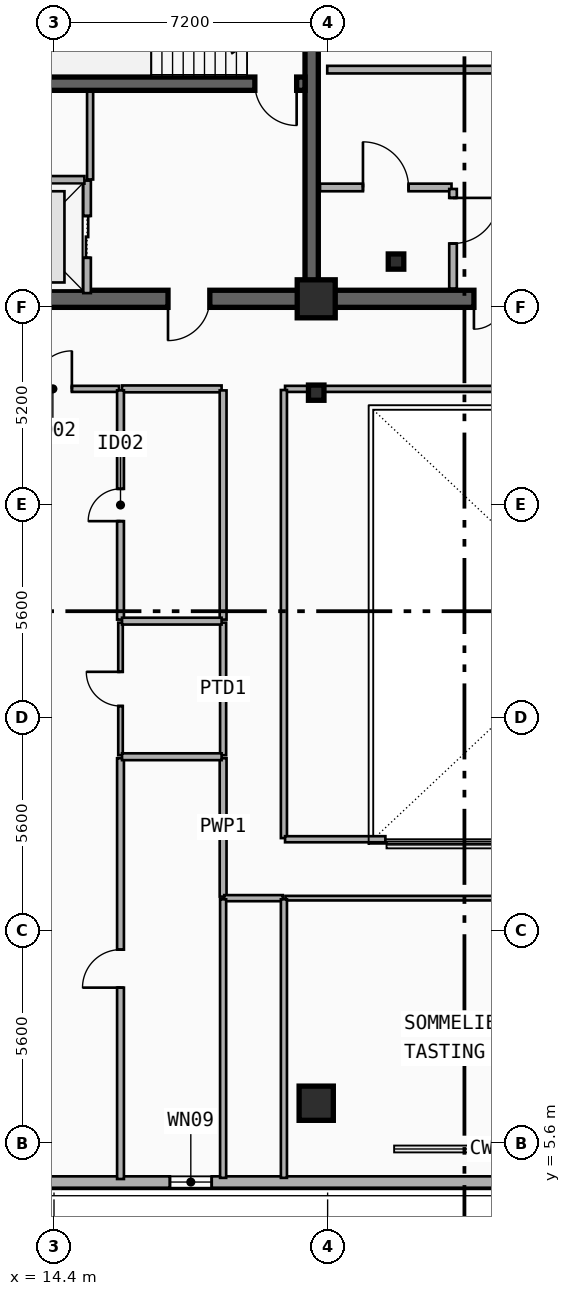
"""IFC4 building model, lengths in metres.
Left out: names, types, materials, properties, quantities, classifications, styles, units other than length and angle.
Written with IfcOpenShell. Run it as: python <this file> out.ifc"""

import sys

from ifc_helpers import new_model, si_unit, direction, frame, frame_2d, origin, origin_2d, place, context, subcontext, project, spatial, rectangle, i_section, extrude, element, fill, save


model = new_model("IFC4")
c1 = context("Model", 3, precision=1e-05, world=origin(), true_north=direction((0.0, 1.0)))
c2 = subcontext(c1, "Body", "Model", "MODEL_VIEW")
j1 = project(units=[si_unit("LENGTHUNIT", "METRE"), si_unit("PLANEANGLEUNIT", "RADIAN")], contexts=[c1])
p1 = place(None, origin())
s1 = spatial("IfcSite", under=j1, at=p1, CompositionType="ELEMENT")
p2 = place(p1, origin())
s2 = spatial("IfcBuilding", under=s1, at=p2, CompositionType="ELEMENT")
p3 = place(p2, frame((0.0, 0.0, 214.8)))
s3 = spatial("IfcBuildingStorey", under=s2, at=p3, CompositionType="ELEMENT", Elevation=214.8)
p4 = place(p3, frame((21.18, 27.82, 0.0), z_axis=(0.0, 0.0, 1.0), x_axis=(-1.0, 0.0, 0.0)))
e1 = element("IfcWall", 1, at=p4, inside=s3, PredefinedType="SHEAR", context=c2, shape_type="SweptSolid", body=[
    extrude(rectangle(XDim=9.03, YDim=0.45, at=frame_2d((4.515, 0.0))), origin(), (0.0, 0.0, 1.0), 3.6),
])
p5 = place(p4, frame((2.68, 0.0, 0.0)))
e2 = element("IfcOpeningElement", 2, at=p5, cuts=e1, PredefinedType="OPENING", context=c2, shape_type="SweptSolid", body=[
    extrude(rectangle(XDim=1.1, YDim=2.15, at=frame_2d((0.55, 1.075))), frame((0.0, 0.235, 0.0), z_axis=(0.0, -1.0, 0.0), x_axis=(1.0, 0.0, 0.0)), (0.0, 0.0, 1.0), 0.47),
])
p6 = place(p3, frame((33.15, 27.82, 0.0), z_axis=(0.0, 0.0, 1.0), x_axis=(-1.0, 0.0, 0.0)))
e3 = element("IfcWall", 3, at=p6, inside=s3, PredefinedType="SHEAR", context=c2, shape_type="SweptSolid", body=[
    extrude(rectangle(XDim=11.97, YDim=0.45, at=frame_2d((5.985, 0.0))), origin(), (0.0, 0.0, 1.0), 3.6),
])
p7 = place(p6, frame((6.1, 0.0, 0.0)))
e4 = element("IfcOpeningElement", 4, at=p7, cuts=e3, PredefinedType="OPENING", context=c2, shape_type="SweptSolid", body=[
    extrude(rectangle(XDim=1.6, YDim=2.2, at=frame_2d((0.8, 1.1))), frame((0.0, 0.235, 0.0), z_axis=(0.0, -1.0, 0.0), x_axis=(1.0, 0.0, 0.0)), (0.0, 0.0, 1.0), 0.47),
])
p8 = place(p3, frame((21.18, 28.045, 0.0), z_axis=(0.0, 0.0, 1.0), x_axis=(0.0, 1.0, 0.0)))
e5 = element("IfcWall", 5, at=p8, inside=s3, PredefinedType="SHEAR", context=c2, shape_type="SweptSolid", body=[
    extrude(rectangle(XDim=8.78, YDim=0.35, at=frame_2d((4.39, 0.0))), origin(), (0.0, 0.0, 1.0), 3.6),
])
p9 = place(p3, frame((21.005, 33.48, 0.0), z_axis=(0.0, 0.0, 1.0), x_axis=(-1.0, 0.0, 0.0)))
e6 = element("IfcWall", 6, at=p9, inside=s3, PredefinedType="SHEAR", context=c2, shape_type="SweptSolid", body=[
    extrude(rectangle(XDim=8.63, YDim=0.35, at=frame_2d((4.315, 0.0))), origin(), (0.0, 0.0, 1.0), 3.6),
])
p10 = place(p9, frame((0.22, 0.0, 0.0)))
e7 = element("IfcOpeningElement", 7, at=p10, cuts=e6, PredefinedType="OPENING", context=c2, shape_type="SweptSolid", body=[
    extrude(rectangle(XDim=1.1, YDim=2.15, at=frame_2d((0.55, 1.075))), frame((0.0, 0.185, 0.0), z_axis=(0.0, -1.0, 0.0), x_axis=(1.0, 0.0, 0.0)), (0.0, 0.0, 1.0), 0.37),
])
p11 = place(p3, frame((23.4, 28.8, 0.0), z_axis=(0.0, 0.0, 1.0), x_axis=(1.0, 0.0, 0.0)))
e8 = element("IfcColumn", 8, at=p11, inside=s3, PredefinedType="COLUMN", context=c2, shape_type="SweptSolid", body=[
    extrude(i_section(OverallWidth=0.408, OverallDepth=0.4, WebThickness=0.025, FlangeThickness=0.039, FilletRadius=0.015, at=origin_2d()), origin(), (0.0, 0.0, 1.0), 3.6),
])
p12 = place(p3, frame((21.3, 27.82, 0.0), z_axis=(0.0, 0.0, 1.0), x_axis=(1.0, 0.0, 0.0)))
e9 = element("IfcColumn", 9, at=p12, inside=s3, PredefinedType="COLUMN", context=c2, shape_type="SweptSolid", body=[
    extrude(rectangle(XDim=1.0, YDim=1.0, at=origin_2d()), origin(), (0.0, 0.0, 1.0), 3.6),
])
p13 = place(p3, frame((21.3, 25.35, 0.0), z_axis=(0.0, 0.0, 1.0), x_axis=(1.0, 0.0, 0.0)))
e10 = element("IfcColumn", 10, at=p13, inside=s3, PredefinedType="COLUMN", context=c2, shape_type="SweptSolid", body=[
    extrude(i_section(OverallWidth=0.408, OverallDepth=0.4, WebThickness=0.025, FlangeThickness=0.039, FilletRadius=0.015, at=origin_2d()), origin(), (0.0, 0.0, 1.0), 3.6),
])
p14 = place(p3, frame((21.3, 6.763, 0.0), z_axis=(0.0, -0.090237335163, 0.995920289653), x_axis=(1.0, 0.0, 0.0)))
e11 = element("IfcColumn", 11, at=p14, inside=s3, PredefinedType="COLUMN", context=c2, shape_type="SweptSolid", body=[
    extrude(rectangle(XDim=0.9, YDim=0.9, at=origin_2d()), origin(), (0.0, 0.0, 1.0), 3.615),
])
p15 = place(p3, frame((48.0, 4.58, 0.0), z_axis=(0.0, 0.0, 1.0), x_axis=(-1.0, 0.0, 0.0)))
e12 = element("IfcWall", 12, at=p15, inside=s3, PredefinedType="SOLIDWALL", context=c2, shape_type="SweptSolid", body=[
    extrude(rectangle(XDim=38.4, YDim=0.3, at=frame_2d((19.2, 0.0))), origin(), (0.0, 0.0, 1.0), 3.34),
])
p16 = place(p15, frame((33.909, 0.0, 1.05)))
e13 = element("IfcOpeningElement", 13, at=p16, cuts=e12, PredefinedType="OPENING", context=c2, shape_type="SweptSolid", body=[
    extrude(rectangle(XDim=1.2, YDim=1.5, at=frame_2d((0.6, 0.75))), frame((0.0, 0.16, 0.0), z_axis=(0.0, -1.0, 0.0), x_axis=(1.0, 0.0, 0.0)), (0.0, 0.0, 1.0), 0.32),
])
p17 = place(p15, frame((29.45, 0.0, 0.48)))
e14 = element("IfcOpeningElement", 14, at=p17, cuts=e12, PredefinedType="OPENING", context=c2, shape_type="SweptSolid", body=[
    extrude(rectangle(XDim=1.1, YDim=1.05, at=frame_2d((0.55, 0.525))), frame((0.0, 0.16, 0.0), z_axis=(0.0, -1.0, 0.0), x_axis=(1.0, 0.0, 0.0)), (0.0, 0.0, 1.0), 0.32),
])
p18 = place(p15, frame((35.994, 0.0, 0.48)))
e15 = element("IfcOpeningElement", 15, at=p18, cuts=e12, PredefinedType="OPENING", context=c2, shape_type="SweptSolid", body=[
    extrude(rectangle(XDim=1.8, YDim=1.8, at=frame_2d((0.9, 0.9))), frame((0.0, 0.16, 0.0), z_axis=(0.0, -1.0, 0.0), x_axis=(1.0, 0.0, 0.0)), (0.0, 0.0, 1.0), 0.32),
])
p19 = place(p15, frame((13.014, 0.0, 0.65)))
e16 = element("IfcOpeningElement", 16, at=p19, cuts=e12, PredefinedType="OPENING", context=c2, shape_type="SweptSolid", body=[
    extrude(rectangle(XDim=2.0, YDim=2.2, at=frame_2d((1.0, 1.1))), frame((0.0, 0.16, 0.0), z_axis=(0.0, -1.0, 0.0), x_axis=(1.0, 0.0, 0.0)), (0.0, 0.0, 1.0), 0.32),
])
p20 = place(p15, frame((2.9, 0.0, 0.34)))
e17 = element("IfcOpeningElement", 17, at=p20, cuts=e12, PredefinedType="OPENING", context=c2, shape_type="SweptSolid", body=[
    extrude(rectangle(XDim=1.8, YDim=1.8, at=frame_2d((0.9, 0.9))), frame((0.0, 0.16, 0.0), z_axis=(0.0, -1.0, 0.0), x_axis=(1.0, 0.0, 0.0)), (0.0, 0.0, 1.0), 0.32),
])
p21 = place(p15, frame((0.41, 0.0, 0.48)))
e18 = element("IfcOpeningElement", 18, at=p21, cuts=e12, PredefinedType="OPENING", context=c2, shape_type="SweptSolid", body=[
    extrude(rectangle(XDim=1.8, YDim=1.8, at=frame_2d((0.9, 0.9))), frame((0.0, 0.16, 0.0), z_axis=(0.0, -1.0, 0.0), x_axis=(1.0, 0.0, 0.0)), (0.0, 0.0, 1.0), 0.32),
])
p22 = place(p3, frame((15.27, 27.97, 0.0), z_axis=(0.0, 0.0, 1.0), x_axis=(0.0, 1.0, 0.0)))
e19 = element("IfcWall", 19, at=p22, inside=s3, PredefinedType="PARTITIONING", context=c2, shape_type="SweptSolid", body=[
    extrude(rectangle(XDim=2.96, YDim=0.2, at=frame_2d((1.48, 0.0))), origin(), (0.0, 0.0, 1.0), 2.41),
])
p23 = place(p22, frame((0.93, 0.0, 0.0)))
e20 = element("IfcOpeningElement", 20, at=p23, cuts=e19, PredefinedType="OPENING", context=c2, shape_type="SweptSolid", body=[
    extrude(rectangle(XDim=1.1, YDim=2.15, at=frame_2d((0.55, 1.075))), frame((0.0, 0.11, 0.0), z_axis=(0.0, -1.0, 0.0), x_axis=(1.0, 0.0, 0.0)), (0.0, 0.0, 1.0), 0.22),
])
p24 = place(p3, frame((12.45, 30.95, 0.0), z_axis=(0.0, 0.0, 1.0), x_axis=(1.0, 0.0, 0.0)))
e21 = element("IfcWall", 21, at=p24, inside=s3, PredefinedType="PARTITIONING", context=c2, shape_type="SweptSolid", body=[
    extrude(rectangle(XDim=2.75, YDim=0.2, at=frame_2d((1.375, 0.0))), origin(), (0.0, 0.0, 1.0), 2.41),
])
p25 = place(p3, frame((21.4, 30.75, 0.0), z_axis=(0.0, 0.0, 1.0), x_axis=(1.0, 0.0, 0.0)))
e22 = element("IfcWall", 22, at=p25, inside=s3, PredefinedType="PARTITIONING", context=c2, shape_type="SweptSolid", body=[
    extrude(rectangle(XDim=3.46, YDim=0.2, at=frame_2d((1.73, 0.0))), origin(), (0.0, 0.0, 1.0), 2.41),
])
p26 = place(p25, frame((1.13, 0.0, 0.0)))
e23 = element("IfcOpeningElement", 23, at=p26, cuts=e22, PredefinedType="OPENING", context=c2, shape_type="SweptSolid", body=[
    extrude(rectangle(XDim=1.2, YDim=2.15, at=frame_2d((0.6, 1.075))), frame((0.0, 0.11, 0.0), z_axis=(0.0, -1.0, 0.0), x_axis=(1.0, 0.0, 0.0)), (0.0, 0.0, 1.0), 0.22),
])
p27 = place(p3, frame((21.59, 33.85, 0.0), z_axis=(0.0, 0.0, 1.0), x_axis=(1.0, 0.0, 0.0)))
e24 = element("IfcWall", 24, at=p27, inside=s3, PredefinedType="PARTITIONING", context=c2, shape_type="SweptSolid", body=[
    extrude(rectangle(XDim=11.34, YDim=0.2, at=frame_2d((5.67, 0.0))), origin(), (0.0, 0.0, 1.0), 2.41),
])
p28 = place(p27, frame((5.07, 0.0, 0.0)))
e25 = element("IfcOpeningElement", 25, at=p28, cuts=e24, PredefinedType="OPENING", context=c2, shape_type="SweptSolid", body=[
    extrude(rectangle(XDim=1.2, YDim=2.15, at=frame_2d((0.6, 1.075))), frame((0.0, 0.11, 0.0), z_axis=(0.0, -1.0, 0.0), x_axis=(1.0, 0.0, 0.0)), (0.0, 0.0, 1.0), 0.22),
])
p29 = place(p3, frame((24.9, 30.71, 0.0), z_axis=(0.0, 0.0, 1.0), x_axis=(0.0, -1.0, 0.0)))
e26 = element("IfcWall", 26, at=p29, inside=s3, PredefinedType="PARTITIONING", context=c2, shape_type="SweptSolid", body=[
    extrude(rectangle(XDim=2.62, YDim=0.2, at=frame_2d((1.31, 0.0))), origin(), (0.0, 0.0, 1.0), 2.72),
])
p30 = place(p29, frame((0.235, 0.0, 0.0)))
e27 = element("IfcOpeningElement", 27, at=p30, cuts=e26, PredefinedType="OPENING", context=c2, shape_type="SweptSolid", body=[
    extrude(rectangle(XDim=1.2, YDim=2.15, at=frame_2d((0.6, 1.075))), frame((0.0, 0.11, 0.0), z_axis=(0.0, -1.0, 0.0), x_axis=(1.0, 0.0, 0.0)), (0.0, 0.0, 1.0), 0.22),
])
p31 = place(p3, frame((12.631, 25.45, 0.0), z_axis=(0.0, 0.0, 1.0), x_axis=(1.0, 0.0, 0.0)))
e28 = element("IfcWall", 28, at=p31, inside=s3, PredefinedType="PARTITIONING", context=c2, shape_type="SweptSolid", body=[
    extrude(rectangle(XDim=3.479, YDim=0.16, at=frame_2d((1.74, 0.0))), origin(), (0.0, 0.0, 1.0), 2.52),
])
p32 = place(p31, frame((1.24, 0.0, 0.0)))
e29 = element("IfcOpeningElement", 29, at=p32, cuts=e28, PredefinedType="OPENING", context=c2, shape_type="SweptSolid", body=[
    extrude(rectangle(XDim=1.0, YDim=2.15, at=frame_2d((0.5, 1.075))), frame((0.0, 0.09, 0.0), z_axis=(0.0, -1.0, 0.0), x_axis=(1.0, 0.0, 0.0)), (0.0, 0.0, 1.0), 0.18),
])
p33 = place(p3, frame((16.19, 25.45, 0.0), z_axis=(0.0, 0.0, 1.0), x_axis=(1.0, 0.0, 0.0)))
e30 = element("IfcWall", 30, at=p33, inside=s3, PredefinedType="PLUMBINGWALL", context=c2, shape_type="SweptSolid", body=[
    extrude(rectangle(XDim=2.62, YDim=0.18, at=frame_2d((1.31, 0.0))), origin(), (0.0, 0.0, 1.0), 3.34),
])
p34 = place(p3, frame((18.85, 12.09, 0.0), z_axis=(0.0, 0.0, 1.0), x_axis=(0.0, 1.0, 0.0)))
e31 = element("IfcWall", 31, at=p34, inside=s3, PredefinedType="PLUMBINGWALL", context=c2, shape_type="SweptSolid", body=[
    extrude(rectangle(XDim=3.641, YDim=0.18, at=frame_2d((1.82, 0.0))), origin(), (0.0, 0.0, 1.0), 2.87),
])
p35 = place(p3, frame((18.85, 15.811, 0.0), z_axis=(0.0, 0.0, 1.0), x_axis=(0.0, 1.0, 0.0)))
e32 = element("IfcWall", 32, at=p35, inside=s3, PredefinedType="PARTITIONING", context=c2, shape_type="SweptSolid", body=[
    extrude(rectangle(XDim=3.488, YDim=0.16, at=frame_2d((1.744, 0.0))), origin(), (0.0, 0.0, 1.0), 3.01),
])
p36 = place(p3, frame((18.85, 19.379, 0.0), z_axis=(0.0, 0.0, 1.0), x_axis=(0.0, 1.0, 0.0)))
e33 = element("IfcWall", 33, at=p36, inside=s3, PredefinedType="PLUMBINGWALL", context=c2, shape_type="SweptSolid", body=[
    extrude(rectangle(XDim=6.031, YDim=0.18, at=frame_2d((3.016, 0.0))), origin(), (0.0, 0.0, 1.0), 2.87),
])
p37 = place(p3, frame((20.49, 12.05, 0.0), z_axis=(0.0, 0.0, 1.0), x_axis=(1.0, 0.0, 0.0)))
e34 = element("IfcWall", 34, at=p37, inside=s3, PredefinedType="PARTITIONING", context=c2, shape_type="SweptSolid", body=[
    extrude(rectangle(XDim=15.82, YDim=0.12, at=frame_2d((7.91, 0.0))), origin(), (0.0, 0.0, 1.0), 2.52),
])
p38 = place(p37, frame((7.46, 0.0, 0.0)))
e35 = element("IfcOpeningElement", 35, at=p38, cuts=e34, PredefinedType="OPENING", context=c2, shape_type="SweptSolid", body=[
    extrude(rectangle(XDim=0.9, YDim=2.1, at=frame_2d((0.45, 1.05))), frame((0.0, 0.07, 0.0), z_axis=(0.0, -1.0, 0.0), x_axis=(1.0, 0.0, 0.0)), (0.0, 0.0, 1.0), 0.14),
])
p39 = place(p3, frame((16.15, 4.66, 0.0), z_axis=(0.0, 0.0, 1.0), x_axis=(0.0, 1.0, 0.0)))
e36 = element("IfcWall", 36, at=p39, inside=s3, PredefinedType="PLUMBINGWALL", context=c2, shape_type="SweptSolid", body=[
    extrude(rectangle(XDim=11.071, YDim=0.18, at=frame_2d((5.536, 0.0))), origin(), (0.0, 0.0, 1.0), 2.87),
])
p40 = place(p39, frame((5.035, 0.0, 0.0)))
e37 = element("IfcOpeningElement", 37, at=p40, cuts=e36, PredefinedType="OPENING", context=c2, shape_type="SweptSolid", body=[
    extrude(rectangle(XDim=1.0, YDim=2.15, at=frame_2d((0.5, 1.075))), frame((0.0, 0.1, 0.0), z_axis=(0.0, -1.0, 0.0), x_axis=(1.0, 0.0, 0.0)), (0.0, 0.0, 1.0), 0.2),
])
p41 = place(p3, frame((16.15, 15.811, 0.0), z_axis=(0.0, 0.0, 1.0), x_axis=(0.0, 1.0, 0.0)))
e38 = element("IfcWall", 38, at=p41, inside=s3, PredefinedType="PARTITIONING", context=c2, shape_type="SweptSolid", body=[
    extrude(rectangle(XDim=3.488, YDim=0.12, at=frame_2d((1.744, 0.0))), origin(), (0.0, 0.0, 1.0), 3.01),
])
p42 = place(p41, frame((1.294, 0.0, 0.0)))
e39 = element("IfcOpeningElement", 39, at=p42, cuts=e38, PredefinedType="OPENING", context=c2, shape_type="SweptSolid", body=[
    extrude(rectangle(XDim=0.9, YDim=2.1, at=frame_2d((0.45, 1.05))), frame((0.0, 0.07, 0.0), z_axis=(0.0, -1.0, 0.0), x_axis=(1.0, 0.0, 0.0)), (0.0, 0.0, 1.0), 0.14),
])
p43 = place(p3, frame((16.15, 19.379, 0.0), z_axis=(0.0, 0.0, 1.0), x_axis=(0.0, 1.0, 0.0)))
e40 = element("IfcWall", 40, at=p43, inside=s3, PredefinedType="PLUMBINGWALL", context=c2, shape_type="SweptSolid", body=[
    extrude(rectangle(XDim=6.031, YDim=0.18, at=frame_2d((3.016, 0.0))), origin(), (0.0, 0.0, 1.0), 2.87),
])
p44 = place(p43, frame((2.591, 0.0, 0.0)))
e41 = element("IfcOpeningElement", 41, at=p44, cuts=e40, PredefinedType="OPENING", context=c2, shape_type="SweptSolid", body=[
    extrude(rectangle(XDim=0.85, YDim=2.1, at=frame_2d((0.425, 1.05))), frame((0.0, 0.1, 0.0), z_axis=(0.0, -1.0, 0.0), x_axis=(1.0, 0.0, 0.0)), (0.0, 0.0, 1.0), 0.2),
])
p45 = place(p3, frame((16.19, 15.771, 0.0), z_axis=(0.0, 0.0, 1.0), x_axis=(1.0, 0.0, 0.0)))
e42 = element("IfcWall", 42, at=p45, inside=s3, PredefinedType="PLUMBINGWALL", context=c2, shape_type="SweptSolid", body=[
    extrude(rectangle(XDim=2.62, YDim=0.18, at=frame_2d((1.31, 0.0))), origin(), (0.0, 0.0, 1.0), 3.34),
])
p46 = place(p3, frame((16.19, 19.339, 0.0), z_axis=(0.0, 0.0, 1.0), x_axis=(1.0, 0.0, 0.0)))
e43 = element("IfcWall", 43, at=p46, inside=s3, PredefinedType="PLUMBINGWALL", context=c2, shape_type="SweptSolid", body=[
    extrude(rectangle(XDim=2.62, YDim=0.18, at=frame_2d((1.31, 0.0))), origin(), (0.0, 0.0, 1.0), 3.01),
])
p47 = place(p3, frame((15.35, 30.96, 0.0), z_axis=(0.0, 0.0, 1.0), x_axis=(0.0, 1.0, 0.0)))
e44 = element("IfcWall", 44, at=p47, inside=s3, PredefinedType="PARTITIONING", context=c2, shape_type="SweptSolid", body=[
    extrude(rectangle(XDim=2.31, YDim=0.16, at=frame_2d((1.155, 0.0))), origin(), (0.0, 0.0, 1.0), 3.34),
])
p48 = place(p3, frame((20.48, 25.45, 0.0), z_axis=(0.0, 0.0, 1.0), x_axis=(1.0, 0.0, 0.0)))
e45 = element("IfcWall", 45, at=p48, inside=s3, PredefinedType="PARTITIONING", context=c2, shape_type="SweptSolid", body=[
    extrude(rectangle(XDim=15.84, YDim=0.16, at=frame_2d((7.92, 0.0))), origin(), (0.0, 0.0, 1.0), 2.52),
])
p49 = place(p3, frame((18.88, 12.05, 0.0), z_axis=(0.0, 0.0, 1.0), x_axis=(1.0, 0.0, 0.0)))
e46 = element("IfcWall", 46, at=p49, inside=s3, PredefinedType="PARTITIONING", context=c2, shape_type="SweptSolid", body=[
    extrude(rectangle(XDim=1.54, YDim=0.16, at=frame_2d((0.77, 0.0))), origin(), (0.0, 0.0, 1.0), 3.34),
])
p50 = place(p3, frame((20.45, 13.63, 0.0), z_axis=(0.0, 0.0, 1.0), x_axis=(0.0, 1.0, 0.0)))
e47 = element("IfcWall", 47, at=p50, inside=s3, PredefinedType="PARTITIONING", context=c2, shape_type="SweptSolid", body=[
    extrude(rectangle(XDim=11.79, YDim=0.16, at=frame_2d((5.895, 0.0))), origin(), (0.0, 0.0, 1.0), 2.87),
])
p51 = place(p3, frame((20.48, 13.6, 0.0), z_axis=(0.0, 0.0, 1.0), x_axis=(1.0, 0.0, 0.0)))
e48 = element("IfcWall", 48, at=p51, inside=s3, PredefinedType="PARTITIONING", context=c2, shape_type="SweptSolid", body=[
    extrude(rectangle(XDim=2.64, YDim=0.16, at=frame_2d((1.32, 0.0))), origin(), (0.0, 0.0, 1.0), 2.52),
])
for number, where, z_axis, x_axis in (
    (49, (18.85, 4.69, 0.0), (0.0, 0.0, 1.0), (0.0, 1.0, 0.0)),
    (50, (20.45, 4.69, 0.0), (0.0, 0.0, 1.0), (0.0, 1.0, 0.0)),
):
    element("IfcWall", number, at=place(p3, frame(where, z_axis=z_axis, x_axis=x_axis)), inside=s3, PredefinedType="PARTITIONING", context=c2, shape_type="SweptSolid", body=[
        extrude(rectangle(XDim=7.33, YDim=0.16, at=frame_2d((3.665, 0.0))), origin(), (0.0, 0.0, 1.0), 3.0),
    ])
p52 = place(p17, origin())
e51 = element("IfcWindow", 51, at=p52, inside=s3, PartitioningType="SINGLE_PANEL", PredefinedType="WINDOW", context=c2, shape_type="SweptSolid", body=[
    extrude(rectangle(XDim=1.1, YDim=1.05, at=frame_2d((0.55, 0.525))), frame((0.0, 0.03, 0.0), z_axis=(0.0, -1.0, 0.0), x_axis=(1.0, 0.0, 0.0)), (0.0, 0.0, 1.0), 0.06),
])
fill(e14, e51)
p53 = place(p23, origin())
e52 = element("IfcDoor", 52, at=p53, inside=s3, OperationType="DOUBLE_DOOR_SLIDING", PredefinedType="DOOR", context=c2, shape_type="SweptSolid", body=[
    extrude(rectangle(XDim=1.1, YDim=2.15, at=frame_2d((0.55, 1.075))), frame((0.0, 0.025, 0.0), z_axis=(0.0, -1.0, 0.0), x_axis=(1.0, 0.0, 0.0)), (0.0, 0.0, 1.0), 0.05),
])
fill(e20, e52)
p54 = place(p10, origin())
e53 = element("IfcDoor", 53, at=p54, inside=s3, OperationType="SINGLE_SWING_LEFT", PredefinedType="DOOR", context=c2, shape_type="SweptSolid", body=[
    extrude(rectangle(XDim=1.1, YDim=2.15, at=frame_2d((0.55, 1.075))), frame((0.0, 0.025, 0.0), z_axis=(0.0, -1.0, 0.0), x_axis=(1.0, 0.0, 0.0)), (0.0, 0.0, 1.0), 0.05),
])
fill(e7, e53)
p55 = place(p5, origin())
e54 = element("IfcDoor", 54, at=p55, inside=s3, OperationType="SINGLE_SWING_RIGHT", PredefinedType="DOOR", context=c2, shape_type="SweptSolid", body=[
    extrude(rectangle(XDim=1.1, YDim=2.15, at=frame_2d((0.55, 1.075))), frame((0.0, 0.025, 0.0), z_axis=(0.0, -1.0, 0.0), x_axis=(1.0, 0.0, 0.0)), (0.0, 0.0, 1.0), 0.05),
])
fill(e2, e54)
p56 = place(p7, origin())
e55 = element("IfcDoor", 55, at=p56, inside=s3, OperationType="SINGLE_SWING_LEFT", PredefinedType="DOOR", context=c2, shape_type="SweptSolid", body=[
    extrude(rectangle(XDim=1.6, YDim=2.2, at=frame_2d((0.8, 1.1))), frame((0.0, 0.025, 0.0), z_axis=(0.0, -1.0, 0.0), x_axis=(1.0, 0.0, 0.0)), (0.0, 0.0, 1.0), 0.05),
])
fill(e4, e55)
p57 = place(p26, origin())
e56 = element("IfcDoor", 56, at=p57, inside=s3, OperationType="SINGLE_SWING_LEFT", PredefinedType="DOOR", context=c2, shape_type="SweptSolid", body=[
    extrude(rectangle(XDim=1.2, YDim=2.15, at=frame_2d((0.6, 1.075))), frame((0.0, 0.025, 0.0), z_axis=(0.0, -1.0, 0.0), x_axis=(1.0, 0.0, 0.0)), (0.0, 0.0, 1.0), 0.05),
])
fill(e23, e56)
p58 = place(p30, origin())
e57 = element("IfcDoor", 57, at=p58, inside=s3, OperationType="SINGLE_SWING_LEFT", PredefinedType="DOOR", context=c2, shape_type="SweptSolid", body=[
    extrude(rectangle(XDim=1.2, YDim=2.15, at=frame_2d((0.6, 1.075))), frame((0.0, 0.025, 0.0), z_axis=(0.0, -1.0, 0.0), x_axis=(1.0, 0.0, 0.0)), (0.0, 0.0, 1.0), 0.05),
])
fill(e27, e57)
p59 = place(p32, origin())
e58 = element("IfcDoor", 58, at=p59, inside=s3, OperationType="SINGLE_SWING_RIGHT", PredefinedType="DOOR", context=c2, shape_type="SweptSolid", body=[
    extrude(rectangle(XDim=1.0, YDim=2.15, at=frame_2d((0.5, 1.075))), frame((0.0, 0.025, 0.0), z_axis=(0.0, -1.0, 0.0), x_axis=(1.0, 0.0, 0.0)), (0.0, 0.0, 1.0), 0.05),
])
fill(e29, e58)
p60 = place(p40, origin())
e59 = element("IfcDoor", 59, at=p60, inside=s3, OperationType="SINGLE_SWING_LEFT", PredefinedType="DOOR", context=c2, shape_type="SweptSolid", body=[
    extrude(rectangle(XDim=1.0, YDim=2.15, at=frame_2d((0.5, 1.075))), frame((0.0, 0.025, 0.0), z_axis=(0.0, -1.0, 0.0), x_axis=(1.0, 0.0, 0.0)), (0.0, 0.0, 1.0), 0.05),
])
fill(e37, e59)
p61 = place(p42, origin())
e60 = element("IfcDoor", 60, at=p61, inside=s3, OperationType="SINGLE_SWING_RIGHT", PredefinedType="DOOR", context=c2, shape_type="SweptSolid", body=[
    extrude(rectangle(XDim=0.9, YDim=2.1, at=frame_2d((0.45, 1.05))), frame((0.0, 0.025, 0.0), z_axis=(0.0, -1.0, 0.0), x_axis=(1.0, 0.0, 0.0)), (0.0, 0.0, 1.0), 0.05),
])
fill(e39, e60)
p62 = place(p44, origin())
e61 = element("IfcDoor", 61, at=p62, inside=s3, OperationType="SINGLE_SWING_LEFT", PredefinedType="DOOR", context=c2, shape_type="SweptSolid", body=[
    extrude(rectangle(XDim=0.85, YDim=2.1, at=frame_2d((0.425, 1.05))), frame((0.0, 0.025, 0.0), z_axis=(0.0, -1.0, 0.0), x_axis=(1.0, 0.0, 0.0)), (0.0, 0.0, 1.0), 0.05),
])
fill(e41, e61)
save(model, sys.argv[1])
